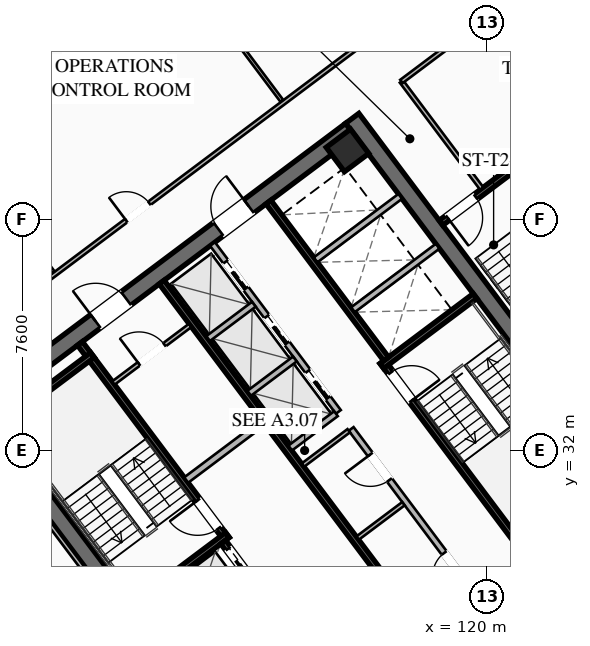
"""IFC4 building model, lengths in metres.
Left out: names, types, materials, properties, quantities, classifications, styles, units other than length and angle.
Written with IfcOpenShell. Run it as: python <this file> out.ifc"""

import sys

from ifc_helpers import new_model, si_unit, direction, frame, frame_2d, origin, origin_2d, place, context, subcontext, project, spatial, rectangle, hollow_rectangle, extrude, element, fill, save


model = new_model("IFC4")
c1 = context("Model", 3, precision=1e-05, world=origin(), true_north=direction((0.0, 1.0)))
c2 = subcontext(c1, "Body", "Model", "MODEL_VIEW")
j1 = project(units=[si_unit("LENGTHUNIT", "METRE"), si_unit("PLANEANGLEUNIT", "RADIAN")], contexts=[c1])
p1 = place(None, origin())
s1 = spatial("IfcSite", under=j1, at=p1, CompositionType="ELEMENT")
p2 = place(p1, origin())
s2 = spatial("IfcBuilding", under=s1, at=p2, CompositionType="ELEMENT")
p3 = place(p2, frame((0.0, 0.0, 149.9)))
s3 = spatial("IfcBuildingStorey", under=s2, at=p3, CompositionType="ELEMENT", Elevation=149.9)
for number, where, z_axis, x_axis in (
    (1, (112.436, 21.077, 0.0), (0.0, 0.0, 1.0), (-0.6, 0.8, 0.0)),
    (2, (115.564, 42.923, 0.0), (0.0, 0.0, 1.0), (0.6, -0.8, 0.0)),
):
    element("IfcWall", number, at=place(p3, frame(where, z_axis=z_axis, x_axis=x_axis)), inside=s3, PredefinedType="SHEAR", context=c2, shape_type="SweptSolid", body=[
        extrude(rectangle(XDim=15.6, YDim=0.55, at=frame_2d((7.8, 0.0))), origin(), (0.0, 0.0, 1.0), 3.55),
    ])
p4 = place(p3, frame((124.539, 30.498, 0.0), z_axis=(0.0, 0.0, 1.0), x_axis=(-0.799998054672, -0.600002593761, 0.0)))
e3 = element("IfcWall", 3, at=p4, inside=s3, PredefinedType="SHEAR", context=c2, shape_type="SweptSolid", body=[
    extrude(rectangle(XDim=15.06, YDim=0.55, at=frame_2d((7.53, 0.0))), origin(), (0.0, 0.0, 1.0), 3.55),
])
p5 = place(p4, frame((9.23, 0.0, 0.0)))
e4 = element("IfcOpeningElement", 4, at=p5, cuts=e3, PredefinedType="OPENING", context=c2, shape_type="SweptSolid", body=[
    extrude(rectangle(XDim=1.25, YDim=2.25, at=frame_2d((0.625, 1.125))), frame((0.0, 0.285, 0.0), z_axis=(0.0, -1.0, 0.0), x_axis=(1.0, 0.0, 0.0)), (0.0, 0.0, 1.0), 0.57),
])
p6 = place(p4, frame((4.18, 0.0, 0.0)))
e5 = element("IfcOpeningElement", 5, at=p6, cuts=e3, PredefinedType="OPENING", context=c2, shape_type="SweptSolid", body=[
    extrude(rectangle(XDim=1.25, YDim=2.25, at=frame_2d((0.625, 1.125))), frame((0.0, 0.285, 0.0), z_axis=(0.0, -1.0, 0.0), x_axis=(1.0, 0.0, 0.0)), (0.0, 0.0, 1.0), 0.57),
])
p7 = place(p3, frame((103.461, 33.502, 0.0), z_axis=(0.0, 0.0, 1.0), x_axis=(0.799998054672, 0.600002593761, 0.0)))
e6 = element("IfcWall", 6, at=p7, inside=s3, PredefinedType="SHEAR", context=c2, shape_type="SweptSolid", body=[
    extrude(rectangle(XDim=15.06, YDim=0.55, at=frame_2d((7.53, 0.0))), origin(), (0.0, 0.0, 1.0), 3.55),
])
p8 = place(p7, frame((4.58, 0.0, 0.0)))
e7 = element("IfcOpeningElement", 7, at=p8, cuts=e6, PredefinedType="OPENING", context=c2, shape_type="SweptSolid", body=[
    extrude(rectangle(XDim=1.25, YDim=2.25, at=frame_2d((0.625, 1.125))), frame((0.0, 0.285, 0.0), z_axis=(0.0, -1.0, 0.0), x_axis=(1.0, 0.0, 0.0)), (0.0, 0.0, 1.0), 0.57),
])
p9 = place(p7, frame((9.63, 0.0, 0.0)))
e8 = element("IfcOpeningElement", 8, at=p9, cuts=e6, PredefinedType="OPENING", context=c2, shape_type="SweptSolid", body=[
    extrude(rectangle(XDim=1.25, YDim=2.25, at=frame_2d((0.625, 1.125))), frame((0.0, 0.285, 0.0), z_axis=(0.0, -1.0, 0.0), x_axis=(1.0, 0.0, 0.0)), (0.0, 0.0, 1.0), 0.57),
])
p10 = place(p3, frame((115.41, 41.87, 0.0), z_axis=(0.0, 0.0, 1.0), x_axis=(0.799999996291, 0.600000004945, 0.0)))
e9 = element("IfcColumn", 9, at=p10, inside=s3, PredefinedType="COLUMN", context=c2, shape_type="SweptSolid", body=[
    extrude(hollow_rectangle(XDim=1.0, YDim=1.0, WallThickness=0.04, at=origin_2d()), origin(), (0.0, 0.0, 1.0), 3.37),
])
p11 = place(p3, frame((111.44, 29.08, 0.0), z_axis=(0.0, 0.0, 1.0), x_axis=(-0.59999029481, 0.8000072788, 0.0)))
e10 = element("IfcWall", 10, at=p11, inside=s3, PredefinedType="SHEAR", context=c2, shape_type="SweptSolid", body=[
    extrude(rectangle(XDim=8.05, YDim=0.2, at=frame_2d((4.025, 0.0))), origin(), (0.0, 0.0, 1.0), 3.37),
])
p12 = place(p11, frame((0.45, 0.0, 0.0)))
e11 = element("IfcOpeningElement", 11, at=p12, cuts=e10, PredefinedType="OPENING", context=c2, shape_type="SweptSolid", body=[
    extrude(rectangle(XDim=1.15, YDim=2.2, at=frame_2d((0.575, 1.1))), frame((0.0, 0.11, 0.0), z_axis=(0.0, -1.0, 0.0), x_axis=(1.0, 0.0, 0.0)), (0.0, 0.0, 1.0), 0.22),
])
for number, where, z_axis, x_axis in (
    (12, (108.396, 26.922, 0.0), (0.0, 0.0, 1.0), (0.8, 0.6, 0.0)),
    (13, (103.956, 32.842, 0.0), (0.0, 0.0, 1.0), (0.8, 0.6, 0.0)),
):
    element("IfcWall", number, at=place(p3, frame(where, z_axis=z_axis, x_axis=x_axis)), inside=s3, PredefinedType="SHEAR", context=c2, shape_type="SweptSolid", body=[
        extrude(rectangle(XDim=3.83, YDim=0.2, at=frame_2d((1.915, 0.0))), origin(), (0.0, 0.0, 1.0), 3.37),
    ])
p13 = place(p3, frame((116.56, 34.92, 0.0), z_axis=(0.0, 0.0, 1.0), x_axis=(0.59999029481, -0.8000072788, 0.0)))
e14 = element("IfcWall", 14, at=p13, inside=s3, PredefinedType="SHEAR", context=c2, shape_type="SweptSolid", body=[
    extrude(rectangle(XDim=8.05, YDim=0.2, at=frame_2d((4.025, 0.0))), origin(), (0.0, 0.0, 1.0), 3.37),
])
p14 = place(p13, frame((0.45, 0.0, 0.0)))
e15 = element("IfcOpeningElement", 15, at=p14, cuts=e14, PredefinedType="OPENING", context=c2, shape_type="SweptSolid", body=[
    extrude(rectangle(XDim=1.15, YDim=2.2, at=frame_2d((0.575, 1.1))), frame((0.0, 0.11, 0.0), z_axis=(0.0, -1.0, 0.0), x_axis=(1.0, 0.0, 0.0)), (0.0, 0.0, 1.0), 0.22),
])
p15 = place(p3, frame((116.54, 34.78, 0.0), z_axis=(0.0, 0.0, 1.0), x_axis=(0.800015298837, 0.599979601008, 0.0)))
e16 = element("IfcWall", 16, at=p15, inside=s3, PredefinedType="SHEAR", context=c2, shape_type="SweptSolid", body=[
    extrude(rectangle(XDim=3.83, YDim=0.2, at=frame_2d((1.915, 0.0))), origin(), (0.0, 0.0, 1.0), 3.37),
])
p16 = place(p3, frame((117.998, 25.936, 0.0), z_axis=(0.0, 0.0, 1.0), x_axis=(-0.600002693989, 0.799997979501, 0.0)))
e17 = element("IfcWall", 17, at=p16, inside=s3, PredefinedType="SHEAR", context=c2, shape_type="SweptSolid", body=[
    extrude(rectangle(XDim=14.5, YDim=0.2, at=frame_2d((7.25, 0.0))), origin(), (0.0, 0.0, 1.0), 3.37),
])
p17 = place(p3, frame((110.104, 31.028, 0.0), z_axis=(0.0, 0.0, 1.0), x_axis=(0.800018601094, 0.59997519774, 0.0)))
e18 = element("IfcWall", 18, at=p17, inside=s3, PredefinedType="SOLIDWALL", context=c2, shape_type="SweptSolid", body=[
    extrude(rectangle(XDim=3.15, YDim=0.22, at=frame_2d((1.575, 0.0))), origin(), (0.0, 0.0, 1.0), 2.723),
])
p18 = place(p3, frame((115.19, 23.83, 0.0), z_axis=(0.0, 0.0, 1.0), x_axis=(-0.599993943644, 0.800004542231, 0.0)))
e19 = element("IfcWall", 19, at=p18, inside=s3, PredefinedType="SHEAR", context=c2, shape_type="SweptSolid", body=[
    extrude(rectangle(XDim=6.45, YDim=0.2, at=frame_2d((3.225, 0.0))), origin(), (0.0, 0.0, 1.0), 3.37),
])
p19 = place(p18, frame((4.875, 0.0, 0.0)))
e20 = element("IfcOpeningElement", 20, at=p19, cuts=e19, PredefinedType="OPENING", context=c2, shape_type="SweptSolid", body=[
    extrude(rectangle(XDim=1.3, YDim=2.25, at=frame_2d((0.65, 1.125))), frame((0.0, 0.11, 0.0), z_axis=(0.0, -1.0, 0.0), x_axis=(1.0, 0.0, 0.0)), (0.0, 0.0, 1.0), 0.22),
])
p20 = place(p18, frame((2.875, 0.0, 0.0)))
e21 = element("IfcOpeningElement", 21, at=p20, cuts=e19, PredefinedType="OPENING", context=c2, shape_type="SweptSolid", body=[
    extrude(rectangle(XDim=1.3, YDim=2.25, at=frame_2d((0.65, 1.125))), frame((0.0, 0.11, 0.0), z_axis=(0.0, -1.0, 0.0), x_axis=(1.0, 0.0, 0.0)), (0.0, 0.0, 1.0), 0.22),
])
p21 = place(p18, frame((0.675, 0.0, 0.0)))
e22 = element("IfcOpeningElement", 22, at=p21, cuts=e19, PredefinedType="OPENING", context=c2, shape_type="SweptSolid", body=[
    extrude(rectangle(XDim=1.3, YDim=2.25, at=frame_2d((0.65, 1.125))), frame((0.0, 0.11, 0.0), z_axis=(0.0, -1.0, 0.0), x_axis=(1.0, 0.0, 0.0)), (0.0, 0.0, 1.0), 0.22),
])
p22 = place(p3, frame((112.81, 40.17, 0.0), z_axis=(0.0, 0.0, 1.0), x_axis=(0.599993943644, -0.800004542231, 0.0)))
e23 = element("IfcWall", 23, at=p22, inside=s3, PredefinedType="SHEAR", context=c2, shape_type="SweptSolid", body=[
    extrude(rectangle(XDim=6.45, YDim=0.2, at=frame_2d((3.225, 0.0))), origin(), (0.0, 0.0, 1.0), 3.37),
])
for number, where, z_axis, x_axis in (
    (24, (115.59, 36.63, 0.0), (0.0, 0.0, 1.0), (0.8, 0.6, 0.0)),
    (25, (114.36, 38.27, 0.0), (0.0, 0.0, 1.0), (0.8, 0.6, 0.0)),
):
    element("IfcWall", number, at=place(p3, frame(where, z_axis=z_axis, x_axis=x_axis)), inside=s3, PredefinedType="SOLIDWALL", context=c2, shape_type="SweptSolid", body=[
        extrude(rectangle(XDim=3.48, YDim=0.2, at=frame_2d((1.74, 0.0))), origin(), (0.0, 0.0, 1.0), 3.37),
    ])
p23 = place(p3, frame((107.71, 34.22, 0.0), z_axis=(0.0, 0.0, 1.0), x_axis=(0.799981399002, 0.60002480053, 0.0)))
e26 = element("IfcWall", 26, at=p23, inside=s3, PredefinedType="PARTITIONING", context=c2, shape_type="SweptSolid", body=[
    extrude(rectangle(XDim=3.15, YDim=0.135, at=frame_2d((1.575, 0.0))), origin(), (0.0, 0.0, 1.0), 2.723),
])
p24 = place(p23, frame((1.05, 0.0, 0.0)))
e27 = element("IfcOpeningElement", 27, at=p24, cuts=e26, PredefinedType="OPENING", context=c2, shape_type="SweptSolid", body=[
    extrude(rectangle(XDim=1.05, YDim=2.2, at=frame_2d((0.525, 1.1))), frame((0.0, 0.077, 0.0), z_axis=(0.0, -1.0, 0.0), x_axis=(1.0, 0.0, 0.0)), (0.0, 0.0, 1.0), 0.155),
])
p25 = place(p3, frame((119.67, 27.19, 0.0), z_axis=(0.0, 0.0, 1.0), x_axis=(-0.599988677396, 0.800008491828, 0.0)))
e28 = element("IfcWall", 28, at=p25, inside=s3, PredefinedType="SOLIDWALL", context=c2, shape_type="SweptSolid", body=[
    extrude(rectangle(XDim=6.9, YDim=0.2, at=frame_2d((3.45, 0.0))), origin(), (0.0, 0.0, 1.0), 2.723),
])
p26 = place(p25, frame((0.85, 0.0, 0.0)))
e29 = element("IfcOpeningElement", 29, at=p26, cuts=e28, PredefinedType="OPENING", context=c2, shape_type="SweptSolid", body=[
    extrude(rectangle(XDim=0.95, YDim=2.05, at=frame_2d((0.475, 1.025))), frame((0.0, 0.11, 0.0), z_axis=(0.0, -1.0, 0.0), x_axis=(1.0, 0.0, 0.0)), (0.0, 0.0, 1.0), 0.22),
])
p27 = place(p25, frame((4.8, 0.0, 0.0)))
e30 = element("IfcOpeningElement", 30, at=p27, cuts=e28, PredefinedType="OPENING", context=c2, shape_type="SweptSolid", body=[
    extrude(rectangle(XDim=1.05, YDim=2.2, at=frame_2d((0.525, 1.1))), frame((0.0, 0.11, 0.0), z_axis=(0.0, -1.0, 0.0), x_axis=(1.0, 0.0, 0.0)), (0.0, 0.0, 1.0), 0.22),
])
for number, where, z_axis, x_axis in (
    (31, (113.946, 31.522, 0.0), (0.0, 0.0, 1.0), (0.8, 0.6, 0.0)),
    (32, (115.746, 29.122, 0.0), (0.0, 0.0, 1.0), (0.8, 0.6, 0.0)),
):
    element("IfcWall", number, at=place(p3, frame(where, z_axis=z_axis, x_axis=x_axis)), inside=s3, PredefinedType="PARTITIONING", context=c2, shape_type="SweptSolid", body=[
        extrude(rectangle(XDim=1.88, YDim=0.135, at=frame_2d((0.94, 0.0))), origin(), (0.0, 0.0, 1.0), 2.723),
    ])
p28 = place(p3, frame((115.11, 33.27, 0.0), z_axis=(0.0, 0.0, 1.0), x_axis=(-0.600011322243, 0.799991508192, 0.0)))
e33 = element("IfcWall", 33, at=p28, inside=s3, PredefinedType="SOLIDWALL", context=c2, shape_type="SweptSolid", body=[
    extrude(rectangle(XDim=6.9, YDim=0.2, at=frame_2d((3.45, 0.0))), origin(), (0.0, 0.0, 1.0), 3.37),
])
p29 = place(p28, frame((0.575, 0.0, 0.0)))
e34 = element("IfcOpeningElement", 34, at=p29, cuts=e33, PredefinedType="OPENING", context=c2, shape_type="SweptSolid", body=[
    extrude(rectangle(XDim=1.1, YDim=2.2, at=frame_2d((0.55, 1.1))), frame((0.0, 0.11, 0.0), z_axis=(0.0, -1.0, 0.0), x_axis=(1.0, 0.0, 0.0)), (0.0, 0.0, 1.0), 0.22),
])
p30 = place(p28, frame((2.825, 0.0, 0.0)))
e35 = element("IfcOpeningElement", 35, at=p30, cuts=e33, PredefinedType="OPENING", context=c2, shape_type="SweptSolid", body=[
    extrude(rectangle(XDim=1.1, YDim=2.2, at=frame_2d((0.55, 1.1))), frame((0.0, 0.11, 0.0), z_axis=(0.0, -1.0, 0.0), x_axis=(1.0, 0.0, 0.0)), (0.0, 0.0, 1.0), 0.22),
])
p31 = place(p28, frame((5.075, 0.0, 0.0)))
e36 = element("IfcOpeningElement", 36, at=p31, cuts=e33, PredefinedType="OPENING", context=c2, shape_type="SweptSolid", body=[
    extrude(rectangle(XDim=1.1, YDim=2.2, at=frame_2d((0.55, 1.1))), frame((0.0, 0.11, 0.0), z_axis=(0.0, -1.0, 0.0), x_axis=(1.0, 0.0, 0.0)), (0.0, 0.0, 1.0), 0.22),
])
p32 = place(p3, frame((113.526, 32.082, 0.0), z_axis=(0.0, 0.0, 1.0), x_axis=(0.800046745961, 0.599937666993, 0.0)))
e37 = element("IfcWall", 37, at=p32, inside=s3, PredefinedType="SOLIDWALL", context=c2, shape_type="SweptSolid", body=[
    extrude(rectangle(XDim=1.88, YDim=0.2, at=frame_2d((0.94, 0.0))), origin(), (0.0, 0.0, 1.0), 3.37),
])
p33 = place(p3, frame((112.176, 33.882, 0.0), z_axis=(0.0, 0.0, 1.0), x_axis=(0.8, 0.6, 0.0)))
e38 = element("IfcWall", 38, at=p33, inside=s3, PredefinedType="SOLIDWALL", context=c2, shape_type="SweptSolid", body=[
    extrude(rectangle(XDim=1.88, YDim=0.2, at=frame_2d((0.94, 0.0))), origin(), (0.0, 0.0, 1.0), 3.37),
])
p34 = place(p3, frame((110.826, 35.682, 0.0), z_axis=(0.0, 0.0, 1.0), x_axis=(0.799984418148, 0.600020775241, 0.0)))
e39 = element("IfcWall", 39, at=p34, inside=s3, PredefinedType="SOLIDWALL", context=c2, shape_type="SweptSolid", body=[
    extrude(rectangle(XDim=1.88, YDim=0.2, at=frame_2d((0.94, 0.0))), origin(), (0.0, 0.0, 1.0), 3.37),
])
p35 = place(p3, frame((121.204, 41.528, 0.0), z_axis=(0.0, 0.0, 1.0), x_axis=(-0.800017232136, -0.599977023131, 0.0)))
e40 = element("IfcWall", 40, at=p35, inside=s3, PredefinedType="SHEAR", context=c2, shape_type="SweptSolid", body=[
    extrude(rectangle(XDim=3.4, YDim=0.2, at=frame_2d((1.7, 0.0))), origin(), (0.0, 0.0, 1.0), 3.37),
])
p36 = place(p35, frame((1.975, 0.0, 0.0)))
e41 = element("IfcOpeningElement", 41, at=p36, cuts=e40, PredefinedType="OPENING", context=c2, shape_type="SweptSolid", body=[
    extrude(rectangle(XDim=1.15, YDim=2.2, at=frame_2d((0.575, 1.1))), frame((0.0, 0.11, 0.0), z_axis=(0.0, -1.0, 0.0), x_axis=(1.0, 0.0, 0.0)), (0.0, 0.0, 1.0), 0.22),
])
p37 = place(p3, frame((119.824, 40.618, 0.0), z_axis=(0.0, 0.0, 1.0), x_axis=(-0.599982243973, 0.800013316712, 0.0)))
e42 = element("IfcWall", 42, at=p37, inside=s3, PredefinedType="PARTITIONING", context=c2, shape_type="SweptSolid", body=[
    extrude(rectangle(XDim=4.4, YDim=0.135, at=frame_2d((2.2, 0.0))), origin(), (0.0, 0.0, 1.0), 2.723),
])
p38 = place(p3, frame((95.738, 30.266, 0.0), z_axis=(0.0, 0.0, 1.0), x_axis=(0.800003744006, 0.59999500796, 0.0)))
e43 = element("IfcWall", 43, at=p38, inside=s3, PredefinedType="PARTITIONING", context=c2, shape_type="SweptSolid", body=[
    extrude(rectangle(XDim=31.3, YDim=0.135, at=frame_2d((15.65, 0.0))), origin(), (0.0, 0.0, 1.0), 2.723),
])
p39 = place(p38, frame((0.3, 0.0, 0.0)))
e44 = element("IfcOpeningElement", 44, at=p39, cuts=e43, PredefinedType="OPENING", context=c2, shape_type="SweptSolid", body=[
    extrude(rectangle(XDim=0.95, YDim=2.05, at=frame_2d((0.475, 1.025))), frame((0.0, 0.077, 0.0), z_axis=(0.0, -1.0, 0.0), x_axis=(1.0, 0.0, 0.0)), (0.0, 0.0, 1.0), 0.155),
])
p40 = place(p38, frame((15.493, 0.0, 0.0)))
e45 = element("IfcOpeningElement", 45, at=p40, cuts=e43, PredefinedType="OPENING", context=c2, shape_type="SweptSolid", body=[
    extrude(rectangle(XDim=0.95, YDim=2.05, at=frame_2d((0.475, 1.025))), frame((0.0, 0.077, 0.0), z_axis=(0.0, -1.0, 0.0), x_axis=(1.0, 0.0, 0.0)), (0.0, 0.0, 1.0), 0.155),
])
p41 = place(p38, frame((30.05, 0.0, 0.0)))
e46 = element("IfcOpeningElement", 46, at=p41, cuts=e43, PredefinedType="OPENING", context=c2, shape_type="SweptSolid", body=[
    extrude(rectangle(XDim=0.95, YDim=2.05, at=frame_2d((0.475, 1.025))), frame((0.0, 0.077, 0.0), z_axis=(0.0, -1.0, 0.0), x_axis=(1.0, 0.0, 0.0)), (0.0, 0.0, 1.0), 0.155),
])
p42 = place(p3, frame((105.73, 37.86, 0.0), z_axis=(0.0, 0.0, 1.0), x_axis=(-0.600009052859, 0.799993210276, 0.0)))
e47 = element("IfcWall", 47, at=p42, inside=s3, PredefinedType="PARTITIONING", context=c2, shape_type="SweptSolid", body=[
    extrude(rectangle(XDim=8.63, YDim=0.11, at=frame_2d((4.315, 0.0))), origin(), (0.0, 0.0, 1.0), 2.723),
])
p43 = place(p3, frame((113.25, 43.5, 0.0), z_axis=(0.0, 0.0, 1.0), x_axis=(-0.599995473644, 0.800003394747, 0.0)))
e48 = element("IfcWall", 48, at=p43, inside=s3, PredefinedType="PARTITIONING", context=c2, shape_type="SweptSolid", body=[
    extrude(rectangle(XDim=8.63, YDim=0.11, at=frame_2d((4.315, 0.0))), origin(), (0.0, 0.0, 1.0), 2.723),
])
p44 = place(p3, frame((133.09, 32.63, 0.0), z_axis=(0.0, 0.0, 1.0), x_axis=(-0.800003744006, -0.59999500796, 0.0)))
e49 = element("IfcWall", 49, at=p44, inside=s3, PredefinedType="PARTITIONING", context=c2, shape_type="SweptSolid", body=[
    extrude(rectangle(XDim=31.3, YDim=0.135, at=frame_2d((15.65, 0.0))), origin(), (0.0, 0.0, 1.0), 2.723),
])
p45 = place(p44, frame((29.97, 0.0, 0.0)))
e50 = element("IfcOpeningElement", 50, at=p45, cuts=e49, PredefinedType="OPENING", context=c2, shape_type="SweptSolid", body=[
    extrude(rectangle(XDim=0.95, YDim=2.05, at=frame_2d((0.475, 1.025))), frame((0.0, 0.077, 0.0), z_axis=(0.0, -1.0, 0.0), x_axis=(1.0, 0.0, 0.0)), (0.0, 0.0, 1.0), 0.155),
])
p46 = place(p44, frame((18.914, 0.0, 0.0)))
e51 = element("IfcOpeningElement", 51, at=p46, cuts=e49, PredefinedType="OPENING", context=c2, shape_type="SweptSolid", body=[
    extrude(rectangle(XDim=0.95, YDim=2.05, at=frame_2d((0.475, 1.025))), frame((0.0, 0.077, 0.0), z_axis=(0.0, -1.0, 0.0), x_axis=(1.0, 0.0, 0.0)), (0.0, 0.0, 1.0), 0.155),
])
p47 = place(p44, frame((0.38, 0.0, 0.0)))
e52 = element("IfcOpeningElement", 52, at=p47, cuts=e49, PredefinedType="OPENING", context=c2, shape_type="SweptSolid", body=[
    extrude(rectangle(XDim=0.95, YDim=2.05, at=frame_2d((0.475, 1.025))), frame((0.0, 0.077, 0.0), z_axis=(0.0, -1.0, 0.0), x_axis=(1.0, 0.0, 0.0)), (0.0, 0.0, 1.0), 0.155),
])
p48 = place(p3, frame((123.824, 49.118, 0.0), z_axis=(0.0, 0.0, 1.0), x_axis=(-0.799996470201, -0.60000470637, 0.0)))
e53 = element("IfcWall", 53, at=p48, inside=s3, PredefinedType="PARTITIONING", context=c2, shape_type="SweptSolid", body=[
    extrude(rectangle(XDim=8.3, YDim=0.135, at=frame_2d((4.15, 0.0))), origin(), (0.0, 0.0, 1.0), 2.723),
])
p49 = place(p48, frame((3.95, 0.0, 0.0)))
e54 = element("IfcOpeningElement", 54, at=p49, cuts=e53, PredefinedType="OPENING", context=c2, shape_type="SweptSolid", body=[
    extrude(rectangle(XDim=0.95, YDim=2.05, at=frame_2d((0.475, 1.025))), frame((0.0, 0.077, 0.0), z_axis=(0.0, -1.0, 0.0), x_axis=(1.0, 0.0, 0.0)), (0.0, 0.0, 1.0), 0.155),
])
p50 = place(p3, frame((112.104, 20.928, 0.0), z_axis=(0.0, 0.0, 1.0), x_axis=(-0.599994940075, 0.800003794918, 0.0)))
e55 = element("IfcWall", 55, at=p50, inside=s3, PredefinedType="PARTITIONING", context=c2, shape_type="SweptSolid", body=[
    extrude(rectangle(XDim=15.44, YDim=0.135, at=frame_2d((7.72, 0.0))), origin(), (0.0, 0.0, 1.0), 2.723),
])
p51 = place(p8, origin())
e56 = element("IfcDoor", 56, at=p51, inside=s3, OperationType="SINGLE_SWING_LEFT", PredefinedType="DOOR", context=c2, shape_type="SweptSolid", body=[
    extrude(rectangle(XDim=1.25, YDim=2.25, at=frame_2d((0.625, 1.125))), frame((0.0, 0.025, 0.0), z_axis=(0.0, -1.0, 0.0), x_axis=(1.0, 0.0, 0.0)), (0.0, 0.0, 1.0), 0.05),
])
fill(e7, e56)
p52 = place(p9, origin())
e57 = element("IfcDoor", 57, at=p52, inside=s3, OperationType="SINGLE_SWING_RIGHT", PredefinedType="DOOR", context=c2, shape_type="SweptSolid", body=[
    extrude(rectangle(XDim=1.25, YDim=2.25, at=frame_2d((0.625, 1.125))), frame((0.0, 0.025, 0.0), z_axis=(0.0, -1.0, 0.0), x_axis=(1.0, 0.0, 0.0)), (0.0, 0.0, 1.0), 0.05),
])
fill(e8, e57)
p53 = place(p12, origin())
e58 = element("IfcDoor", 58, at=p53, inside=s3, OperationType="SINGLE_SWING_RIGHT", PredefinedType="DOOR", context=c2, shape_type="SweptSolid", body=[
    extrude(rectangle(XDim=1.15, YDim=2.2, at=frame_2d((0.575, 1.1))), frame((0.0, 0.025, 0.0), z_axis=(0.0, -1.0, 0.0), x_axis=(1.0, 0.0, 0.0)), (0.0, 0.0, 1.0), 0.05),
])
fill(e11, e58)
p54 = place(p14, origin())
e59 = element("IfcDoor", 59, at=p54, inside=s3, OperationType="SINGLE_SWING_RIGHT", PredefinedType="DOOR", context=c2, shape_type="SweptSolid", body=[
    extrude(rectangle(XDim=1.15, YDim=2.2, at=frame_2d((0.575, 1.1))), frame((0.0, 0.025, 0.0), z_axis=(0.0, -1.0, 0.0), x_axis=(1.0, 0.0, 0.0)), (0.0, 0.0, 1.0), 0.05),
])
fill(e15, e59)
p55 = place(p24, origin())
e60 = element("IfcDoor", 60, at=p55, inside=s3, OperationType="SINGLE_SWING_LEFT", PredefinedType="DOOR", context=c2, shape_type="SweptSolid", body=[
    extrude(rectangle(XDim=1.05, YDim=2.2, at=frame_2d((0.525, 1.1))), frame((0.0, 0.025, 0.0), z_axis=(0.0, -1.0, 0.0), x_axis=(1.0, 0.0, 0.0)), (0.0, 0.0, 1.0), 0.05),
])
fill(e27, e60)
p56 = place(p26, origin())
e61 = element("IfcDoor", 61, at=p56, inside=s3, OperationType="SINGLE_SWING_LEFT", PredefinedType="DOOR", context=c2, shape_type="SweptSolid", body=[
    extrude(rectangle(XDim=0.95, YDim=2.05, at=frame_2d((0.475, 1.025))), frame((0.0, 0.025, 0.0), z_axis=(0.0, -1.0, 0.0), x_axis=(1.0, 0.0, 0.0)), (0.0, 0.0, 1.0), 0.05),
])
fill(e29, e61)
p57 = place(p27, origin())
e62 = element("IfcDoor", 62, at=p57, inside=s3, OperationType="SINGLE_SWING_RIGHT", PredefinedType="DOOR", context=c2, shape_type="SweptSolid", body=[
    extrude(rectangle(XDim=1.05, YDim=2.2, at=frame_2d((0.525, 1.1))), frame((0.0, 0.025, 0.0), z_axis=(0.0, -1.0, 0.0), x_axis=(1.0, 0.0, 0.0)), (0.0, 0.0, 1.0), 0.05),
])
fill(e30, e62)
p58 = place(p36, origin())
e63 = element("IfcDoor", 63, at=p58, inside=s3, OperationType="SINGLE_SWING_RIGHT", PredefinedType="DOOR", context=c2, shape_type="SweptSolid", body=[
    extrude(rectangle(XDim=1.15, YDim=2.2, at=frame_2d((0.575, 1.1))), frame((0.0, 0.025, 0.0), z_axis=(0.0, -1.0, 0.0), x_axis=(1.0, 0.0, 0.0)), (0.0, 0.0, 1.0), 0.05),
])
fill(e41, e63)
p59 = place(p40, origin())
e64 = element("IfcDoor", 64, at=p59, inside=s3, OperationType="SINGLE_SWING_LEFT", PredefinedType="DOOR", context=c2, shape_type="SweptSolid", body=[
    extrude(rectangle(XDim=0.95, YDim=2.05, at=frame_2d((0.475, 1.025))), frame((0.0, 0.025, 0.0), z_axis=(0.0, -1.0, 0.0), x_axis=(1.0, 0.0, 0.0)), (0.0, 0.0, 1.0), 0.05),
])
fill(e45, e64)
p60 = place(p19, origin())
e65 = element("IfcDoor", 65, at=p60, inside=s3, OperationType="SLIDING_TO_LEFT", PredefinedType="DOOR", context=c2, shape_type="SweptSolid", body=[
    extrude(rectangle(XDim=1.3, YDim=2.25, at=frame_2d((0.65, 1.125))), frame((0.0, 0.025, 0.0), z_axis=(0.0, -1.0, 0.0), x_axis=(1.0, 0.0, 0.0)), (0.0, 0.0, 1.0), 0.05),
])
fill(e20, e65)
p61 = place(p29, origin())
e66 = element("IfcDoor", 66, at=p61, inside=s3, OperationType="SLIDING_TO_LEFT", PredefinedType="DOOR", context=c2, shape_type="SweptSolid", body=[
    extrude(rectangle(XDim=1.1, YDim=2.2, at=frame_2d((0.55, 1.1))), frame((0.0, 0.025, 0.0), z_axis=(0.0, -1.0, 0.0), x_axis=(1.0, 0.0, 0.0)), (0.0, 0.0, 1.0), 0.05),
])
fill(e34, e66)
p62 = place(p30, origin())
e67 = element("IfcDoor", 67, at=p62, inside=s3, OperationType="SLIDING_TO_LEFT", PredefinedType="DOOR", context=c2, shape_type="SweptSolid", body=[
    extrude(rectangle(XDim=1.1, YDim=2.2, at=frame_2d((0.55, 1.1))), frame((0.0, 0.025, 0.0), z_axis=(0.0, -1.0, 0.0), x_axis=(1.0, 0.0, 0.0)), (0.0, 0.0, 1.0), 0.05),
])
fill(e35, e67)
p63 = place(p31, origin())
e68 = element("IfcDoor", 68, at=p63, inside=s3, OperationType="SLIDING_TO_LEFT", PredefinedType="DOOR", context=c2, shape_type="SweptSolid", body=[
    extrude(rectangle(XDim=1.1, YDim=2.2, at=frame_2d((0.55, 1.1))), frame((0.0, 0.025, 0.0), z_axis=(0.0, -1.0, 0.0), x_axis=(1.0, 0.0, 0.0)), (0.0, 0.0, 1.0), 0.05),
])
fill(e36, e68)
save(model, sys.argv[1])
